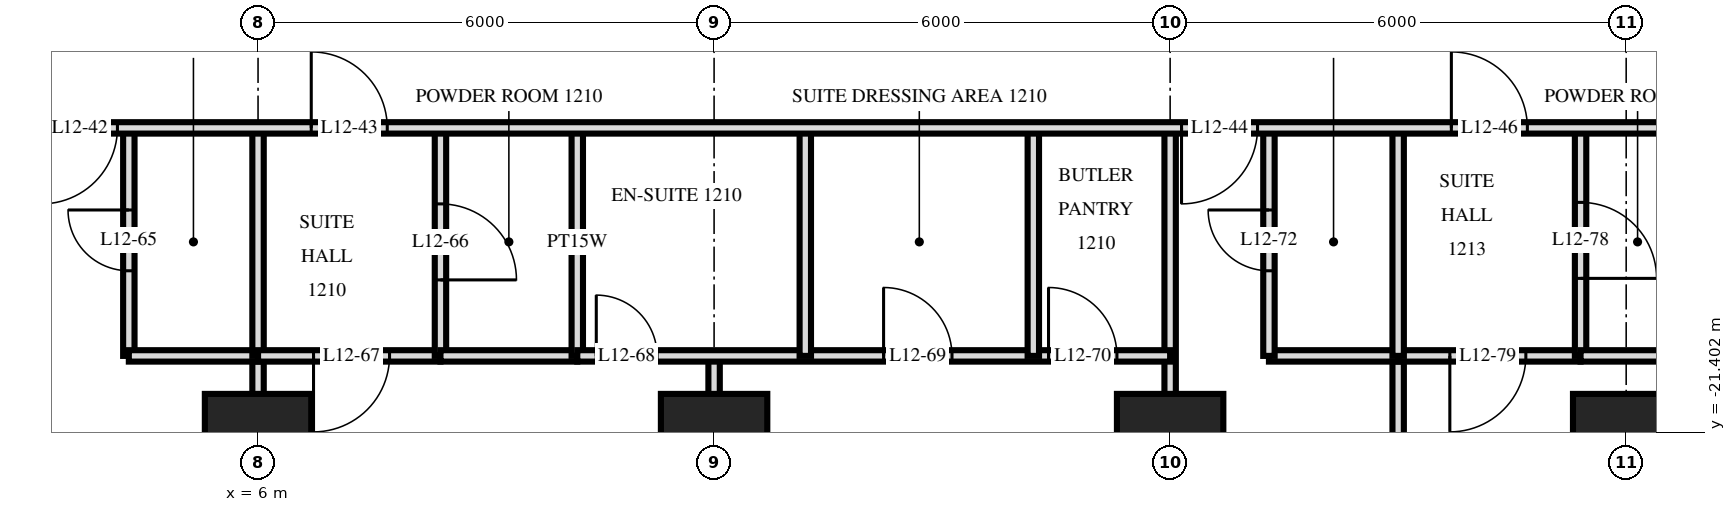
"""IFC4 building model, lengths in metres.
Left out: names, types, materials, properties, quantities, classifications, styles, units other than length and angle.
Written with IfcOpenShell. Run it as: python <this file> out.ifc"""

import sys

from ifc_helpers import new_model, si_unit, direction, frame, frame_2d, origin, origin_2d, place, context, subcontext, project, spatial, rectangle, extrude, element, fill, save


model = new_model("IFC4")
c1 = context("Model", 3, precision=1e-05, world=origin(), true_north=direction((0.0, 1.0)))
c2 = subcontext(c1, "Body", "Model", "MODEL_VIEW")
j1 = project(units=[si_unit("LENGTHUNIT", "METRE"), si_unit("PLANEANGLEUNIT", "RADIAN")], contexts=[c1])
p1 = place(None, origin())
s1 = spatial("IfcSite", under=j1, at=p1, CompositionType="ELEMENT")
p2 = place(p1, origin())
s2 = spatial("IfcBuilding", under=s1, at=p2, CompositionType="ELEMENT")
p3 = place(p2, frame((0.0, 0.0, 52.8)))
s3 = spatial("IfcBuildingStorey", under=s2, at=p3, CompositionType="ELEMENT", Elevation=52.8)
for number, where, z_axis, x_axis in (
    (1, (6.0, -21.6, 0.0), (0.0, 0.0, 1.0), (1.0, 0.0, 0.0)),
    (2, (12.0, -21.6, 0.0), (0.0, 0.0, 1.0), (1.0, 0.0, 0.0)),
    (3, (18.0, -21.6, 0.0), (0.0, 0.0, 1.0), (1.0, 0.0, 0.0)),
    (4, (24.0, -21.6, 0.0), (0.0, 0.0, 1.0), (1.0, 0.0, 0.0)),
):
    element("IfcColumn", number, at=place(p3, frame(where, z_axis=z_axis, x_axis=x_axis)), inside=s3, PredefinedType="COLUMN", context=c2, shape_type="SweptSolid", body=[
        extrude(rectangle(XDim=1.4, YDim=1.4, at=origin_2d()), origin(), (0.0, 0.0, 1.0), 3.6),
    ])
p4 = place(p3, frame((23.4, -20.4, 0.0), z_axis=(0.0, 0.0, 1.0), x_axis=(0.0, 1.0, 0.0)))
e5 = element("IfcWall", 5, at=p4, inside=s3, PredefinedType="PARTITIONING", context=c2, shape_type="SweptSolid", body=[
    extrude(rectangle(XDim=3.0, YDim=0.15, at=frame_2d((1.5, 0.0))), origin(), (0.0, 0.0, 1.0), 3.32),
])
p5 = place(p4, frame((1.02, 0.0, 0.0)))
e6 = element("IfcOpeningElement", 6, at=p5, cuts=e5, PredefinedType="OPENING", context=c2, shape_type="SweptSolid", body=[
    extrude(rectangle(XDim=1.0, YDim=2.1, at=frame_2d((0.5, 1.05))), frame((0.0, 0.085, 0.0), z_axis=(0.0, -1.0, 0.0), x_axis=(1.0, 0.0, 0.0)), (0.0, 0.0, 1.0), 0.17),
])
p6 = place(p3, frame((21.0, -20.4, 0.0), z_axis=(0.0, 0.0, 1.0), x_axis=(0.0, 1.0, 0.0)))
e7 = element("IfcWall", 7, at=p6, inside=s3, PredefinedType="PARTITIONING", context=c2, shape_type="SweptSolid", body=[
    extrude(rectangle(XDim=3.0, YDim=0.15, at=frame_2d((1.5, 0.0))), origin(), (0.0, 0.0, 1.0), 3.32),
])
p7 = place(p3, frame((21.0, -29.22, 0.0), z_axis=(0.0, 0.0, 1.0), x_axis=(0.0, 1.0, 0.0)))
e8 = element("IfcWall", 8, at=p7, inside=s3, PredefinedType="PARTITIONING", context=c2, shape_type="SweptSolid", body=[
    extrude(rectangle(XDim=8.82, YDim=0.15, at=frame_2d((4.41, 0.0))), origin(), (0.0, 0.0, 1.0), 3.32),
])
p8 = place(p3, frame((19.3, -20.4, 0.0), z_axis=(0.0, 0.0, 1.0), x_axis=(0.0, 1.0, 0.0)))
e9 = element("IfcWall", 9, at=p8, inside=s3, PredefinedType="PARTITIONING", context=c2, shape_type="SweptSolid", body=[
    extrude(rectangle(XDim=3.0, YDim=0.15, at=frame_2d((1.5, 0.0))), origin(), (0.0, 0.0, 1.0), 3.32),
])
p9 = place(p8, frame((1.12, 0.0, 0.0)))
e10 = element("IfcOpeningElement", 10, at=p9, cuts=e9, PredefinedType="OPENING", context=c2, shape_type="SweptSolid", body=[
    extrude(rectangle(XDim=0.8, YDim=2.1, at=frame_2d((0.4, 1.05))), frame((0.0, 0.085, 0.0), z_axis=(0.0, -1.0, 0.0), x_axis=(1.0, 0.0, 0.0)), (0.0, 0.0, 1.0), 0.17),
])
p10 = place(p3, frame((18.0, -29.22, 0.0), z_axis=(0.0, 0.0, 1.0), x_axis=(0.0, 1.0, 0.0)))
e11 = element("IfcWall", 11, at=p10, inside=s3, PredefinedType="PARTITIONING", context=c2, shape_type="SweptSolid", body=[
    extrude(rectangle(XDim=11.82, YDim=0.15, at=frame_2d((5.91, 0.0))), origin(), (0.0, 0.0, 1.0), 3.32),
])
for number, where, z_axis, x_axis in (
    (12, (16.2, -20.4, 0.0), (0.0, 0.0, 1.0), (0.0, 1.0, 0.0)),
    (13, (13.2, -20.4, 0.0), (0.0, 0.0, 1.0), (0.0, 1.0, 0.0)),
):
    element("IfcWall", number, at=place(p3, frame(where, z_axis=z_axis, x_axis=x_axis)), inside=s3, PredefinedType="PARTITIONING", context=c2, shape_type="SweptSolid", body=[
        extrude(rectangle(XDim=3.0, YDim=0.15, at=frame_2d((1.5, 0.0))), origin(), (0.0, 0.0, 1.0), 3.32),
    ])
p11 = place(p3, frame((12.0, -29.22, 0.0), z_axis=(0.0, 0.0, 1.0), x_axis=(0.0, 1.0, 0.0)))
e14 = element("IfcWall", 14, at=p11, inside=s3, PredefinedType="PARTITIONING", context=c2, shape_type="SweptSolid", body=[
    extrude(rectangle(XDim=8.82, YDim=0.15, at=frame_2d((4.41, 0.0))), origin(), (0.0, 0.0, 1.0), 3.32),
])
p12 = place(p11, frame((3.85, 0.0, 0.0)))
e15 = element("IfcOpeningElement", 15, at=p12, cuts=e14, PredefinedType="OPENING", context=c2, shape_type="SweptSolid", body=[
    extrude(rectangle(XDim=0.9, YDim=2.1, at=frame_2d((0.45, 1.05))), frame((0.0, 0.085, 0.0), z_axis=(0.0, -1.0, 0.0), x_axis=(1.0, 0.0, 0.0)), (0.0, 0.0, 1.0), 0.17),
])
p13 = place(p3, frame((10.2, -20.4, 0.0), z_axis=(0.0, 0.0, 1.0), x_axis=(0.0, 1.0, 0.0)))
e16 = element("IfcWall", 16, at=p13, inside=s3, PredefinedType="PLUMBINGWALL", context=c2, shape_type="SweptSolid", body=[
    extrude(rectangle(XDim=3.0, YDim=0.15, at=frame_2d((1.5, 0.0))), origin(), (0.0, 0.0, 1.0), 3.32),
])
p14 = place(p3, frame((8.4, -20.4, 0.0), z_axis=(0.0, 0.0, 1.0), x_axis=(0.0, 1.0, 0.0)))
e17 = element("IfcWall", 17, at=p14, inside=s3, PredefinedType="PARTITIONING", context=c2, shape_type="SweptSolid", body=[
    extrude(rectangle(XDim=3.0, YDim=0.15, at=frame_2d((1.5, 0.0))), origin(), (0.0, 0.0, 1.0), 3.32),
])
p15 = place(p14, frame((1.0, 0.0, 0.0)))
e18 = element("IfcOpeningElement", 18, at=p15, cuts=e17, PredefinedType="OPENING", context=c2, shape_type="SweptSolid", body=[
    extrude(rectangle(XDim=1.0, YDim=2.1, at=frame_2d((0.5, 1.05))), frame((0.0, 0.085, 0.0), z_axis=(0.0, -1.0, 0.0), x_axis=(1.0, 0.0, 0.0)), (0.0, 0.0, 1.0), 0.17),
])
p16 = place(p3, frame((6.0, -20.4, 0.0), z_axis=(0.0, 0.0, 1.0), x_axis=(0.0, 1.0, 0.0)))
e19 = element("IfcWall", 19, at=p16, inside=s3, PredefinedType="PARTITIONING", context=c2, shape_type="SweptSolid", body=[
    extrude(rectangle(XDim=3.0, YDim=0.15, at=frame_2d((1.5, 0.0))), origin(), (0.0, 0.0, 1.0), 3.32),
])
p17 = place(p3, frame((6.0, -29.22, 0.0), z_axis=(0.0, 0.0, 1.0), x_axis=(0.0, 1.0, 0.0)))
e20 = element("IfcWall", 20, at=p17, inside=s3, PredefinedType="PARTITIONING", context=c2, shape_type="SweptSolid", body=[
    extrude(rectangle(XDim=8.82, YDim=0.15, at=frame_2d((4.41, 0.0))), origin(), (0.0, 0.0, 1.0), 3.32),
])
p18 = place(p3, frame((4.3, -20.4, 0.0), z_axis=(0.0, 0.0, 1.0), x_axis=(0.0, 1.0, 0.0)))
e21 = element("IfcWall", 21, at=p18, inside=s3, PredefinedType="PARTITIONING", context=c2, shape_type="SweptSolid", body=[
    extrude(rectangle(XDim=3.0, YDim=0.15, at=frame_2d((1.5, 0.0))), origin(), (0.0, 0.0, 1.0), 3.32),
])
p19 = place(p18, frame((1.12, 0.0, 0.0)))
e22 = element("IfcOpeningElement", 22, at=p19, cuts=e21, PredefinedType="OPENING", context=c2, shape_type="SweptSolid", body=[
    extrude(rectangle(XDim=0.8, YDim=2.1, at=frame_2d((0.4, 1.05))), frame((0.0, 0.085, 0.0), z_axis=(0.0, -1.0, 0.0), x_axis=(1.0, 0.0, 0.0)), (0.0, 0.0, 1.0), 0.17),
])
p20 = place(p3, frame((6.0, -20.4, 0.0), z_axis=(0.0, 0.0, 1.0), x_axis=(1.0, 0.0, 0.0)))
e23 = element("IfcWall", 23, at=p20, inside=s3, PredefinedType="PARTITIONING", context=c2, shape_type="SweptSolid", body=[
    extrude(rectangle(XDim=2.4, YDim=0.15, at=frame_2d((1.2, 0.0))), origin(), (0.0, 0.0, 1.0), 3.32),
])
p21 = place(p20, frame((0.73, 0.0, 0.0)))
e24 = element("IfcOpeningElement", 24, at=p21, cuts=e23, PredefinedType="OPENING", context=c2, shape_type="SweptSolid", body=[
    extrude(rectangle(XDim=1.0, YDim=2.1, at=frame_2d((0.5, 1.05))), frame((0.0, 0.085, 0.0), z_axis=(0.0, -1.0, 0.0), x_axis=(1.0, 0.0, 0.0)), (0.0, 0.0, 1.0), 0.17),
])
p22 = place(p3, frame((21.0, -20.4, 0.0), z_axis=(0.0, 0.0, 1.0), x_axis=(1.0, 0.0, 0.0)))
e25 = element("IfcWall", 25, at=p22, inside=s3, PredefinedType="PARTITIONING", context=c2, shape_type="SweptSolid", body=[
    extrude(rectangle(XDim=2.4, YDim=0.15, at=frame_2d((1.2, 0.0))), origin(), (0.0, 0.0, 1.0), 3.32),
])
p23 = place(p22, frame((0.68, 0.0, 0.0)))
e26 = element("IfcOpeningElement", 26, at=p23, cuts=e25, PredefinedType="OPENING", context=c2, shape_type="SweptSolid", body=[
    extrude(rectangle(XDim=1.0, YDim=2.1, at=frame_2d((0.5, 1.05))), frame((0.0, 0.085, 0.0), z_axis=(0.0, -1.0, 0.0), x_axis=(1.0, 0.0, 0.0)), (0.0, 0.0, 1.0), 0.17),
])
p24 = place(p3, frame((4.3, -20.4, 0.0), z_axis=(0.0, 0.0, 1.0), x_axis=(1.0, 0.0, 0.0)))
e27 = element("IfcWall", 27, at=p24, inside=s3, PredefinedType="PARTITIONING", context=c2, shape_type="SweptSolid", body=[
    extrude(rectangle(XDim=1.7, YDim=0.15, at=frame_2d((0.85, 0.0))), origin(), (0.0, 0.0, 1.0), 3.32),
])
p25 = place(p3, frame((10.2, -20.4, 0.0), z_axis=(0.0, 0.0, 1.0), x_axis=(1.0, 0.0, 0.0)))
e28 = element("IfcWall", 28, at=p25, inside=s3, PredefinedType="PARTITIONING", context=c2, shape_type="SweptSolid", body=[
    extrude(rectangle(XDim=7.8, YDim=0.15, at=frame_2d((3.9, 0.0))), origin(), (0.0, 0.0, 1.0), 3.32),
])
p26 = place(p25, frame((0.25, 0.0, 0.0)))
e29 = element("IfcOpeningElement", 29, at=p26, cuts=e28, PredefinedType="OPENING", context=c2, shape_type="SweptSolid", body=[
    extrude(rectangle(XDim=0.8, YDim=2.1, at=frame_2d((0.4, 1.05))), frame((0.0, 0.085, 0.0), z_axis=(0.0, -1.0, 0.0), x_axis=(1.0, 0.0, 0.0)), (0.0, 0.0, 1.0), 0.17),
])
p27 = place(p25, frame((4.03, 0.0, 0.0)))
e30 = element("IfcOpeningElement", 30, at=p27, cuts=e28, PredefinedType="OPENING", context=c2, shape_type="SweptSolid", body=[
    extrude(rectangle(XDim=0.9, YDim=2.1, at=frame_2d((0.45, 1.05))), frame((0.0, 0.085, 0.0), z_axis=(0.0, -1.0, 0.0), x_axis=(1.0, 0.0, 0.0)), (0.0, 0.0, 1.0), 0.17),
])
p28 = place(p25, frame((6.2, 0.0, 0.0)))
e31 = element("IfcOpeningElement", 31, at=p28, cuts=e28, PredefinedType="OPENING", context=c2, shape_type="SweptSolid", body=[
    extrude(rectangle(XDim=0.9, YDim=2.1, at=frame_2d((0.45, 1.05))), frame((0.0, 0.085, 0.0), z_axis=(0.0, -1.0, 0.0), x_axis=(1.0, 0.0, 0.0)), (0.0, 0.0, 1.0), 0.17),
])
p29 = place(p3, frame((19.3, -20.4, 0.0), z_axis=(0.0, 0.0, 1.0), x_axis=(1.0, 0.0, 0.0)))
e32 = element("IfcWall", 32, at=p29, inside=s3, PredefinedType="PARTITIONING", context=c2, shape_type="SweptSolid", body=[
    extrude(rectangle(XDim=1.7, YDim=0.15, at=frame_2d((0.85, 0.0))), origin(), (0.0, 0.0, 1.0), 3.32),
])
p30 = place(p3, frame((8.4, -20.4, 0.0), z_axis=(0.0, 0.0, 1.0), x_axis=(1.0, 0.0, 0.0)))
e33 = element("IfcWall", 33, at=p30, inside=s3, PredefinedType="PLUMBINGWALL", context=c2, shape_type="SweptSolid", body=[
    extrude(rectangle(XDim=1.8, YDim=0.15, at=frame_2d((0.9, 0.0))), origin(), (0.0, 0.0, 1.0), 3.32),
])
p31 = place(p3, frame((23.4, -20.4, 0.0), z_axis=(0.0, 0.0, 1.0), x_axis=(1.0, 0.0, 0.0)))
e34 = element("IfcWall", 34, at=p31, inside=s3, PredefinedType="PLUMBINGWALL", context=c2, shape_type="SweptSolid", body=[
    extrude(rectangle(XDim=1.5, YDim=0.15, at=frame_2d((0.75, 0.0))), origin(), (0.0, 0.0, 1.0), 3.32),
])
p32 = place(p3, frame((-33.12, -17.4, 0.0), z_axis=(0.0, 0.0, 1.0), x_axis=(1.0, 0.0, 0.0)))
e35 = element("IfcWall", 35, at=p32, inside=s3, PredefinedType="PARTITIONING", context=c2, shape_type="SweptSolid", body=[
    extrude(rectangle(XDim=66.24, YDim=0.15, at=frame_2d((33.12, 0.0))), origin(), (0.0, 0.0, 1.0), 3.32),
])
p33 = place(p32, frame((9.27, 0.0, 0.0)))
e36 = element("IfcOpeningElement", 36, at=p33, cuts=e35, PredefinedType="OPENING", context=c2, shape_type="SweptSolid", body=[
    extrude(rectangle(XDim=1.0, YDim=2.1, at=frame_2d((0.5, 1.05))), frame((0.0, 0.085, 0.0), z_axis=(0.0, -1.0, 0.0), x_axis=(1.0, 0.0, 0.0)), (0.0, 0.0, 1.0), 0.17),
])
p34 = place(p32, frame((13.97, 0.0, 0.0)))
e37 = element("IfcOpeningElement", 37, at=p34, cuts=e35, PredefinedType="OPENING", context=c2, shape_type="SweptSolid", body=[
    extrude(rectangle(XDim=1.0, YDim=2.1, at=frame_2d((0.5, 1.05))), frame((0.0, 0.085, 0.0), z_axis=(0.0, -1.0, 0.0), x_axis=(1.0, 0.0, 0.0)), (0.0, 0.0, 1.0), 0.17),
])
p35 = place(p32, frame((15.27, 0.0, 0.0)))
e38 = element("IfcOpeningElement", 38, at=p35, cuts=e35, PredefinedType="OPENING", context=c2, shape_type="SweptSolid", body=[
    extrude(rectangle(XDim=1.0, YDim=2.1, at=frame_2d((0.5, 1.05))), frame((0.0, 0.085, 0.0), z_axis=(0.0, -1.0, 0.0), x_axis=(1.0, 0.0, 0.0)), (0.0, 0.0, 1.0), 0.17),
])
p36 = place(p32, frame((19.97, 0.0, 0.0)))
e39 = element("IfcOpeningElement", 39, at=p36, cuts=e35, PredefinedType="OPENING", context=c2, shape_type="SweptSolid", body=[
    extrude(rectangle(XDim=1.0, YDim=2.1, at=frame_2d((0.5, 1.05))), frame((0.0, 0.085, 0.0), z_axis=(0.0, -1.0, 0.0), x_axis=(1.0, 0.0, 0.0)), (0.0, 0.0, 1.0), 0.17),
])
p37 = place(p32, frame((22.27, 0.0, 0.0)))
e40 = element("IfcOpeningElement", 40, at=p37, cuts=e35, PredefinedType="OPENING", context=c2, shape_type="SweptSolid", body=[
    extrude(rectangle(XDim=1.0, YDim=2.1, at=frame_2d((0.5, 1.05))), frame((0.0, 0.085, 0.0), z_axis=(0.0, -1.0, 0.0), x_axis=(1.0, 0.0, 0.0)), (0.0, 0.0, 1.0), 0.17),
])
p38 = place(p32, frame((28.97, 0.0, 0.0)))
e41 = element("IfcOpeningElement", 41, at=p38, cuts=e35, PredefinedType="OPENING", context=c2, shape_type="SweptSolid", body=[
    extrude(rectangle(XDim=1.0, YDim=2.1, at=frame_2d((0.5, 1.05))), frame((0.0, 0.085, 0.0), z_axis=(0.0, -1.0, 0.0), x_axis=(1.0, 0.0, 0.0)), (0.0, 0.0, 1.0), 0.17),
])
p39 = place(p32, frame((30.27, 0.0, 0.0)))
e42 = element("IfcOpeningElement", 42, at=p39, cuts=e35, PredefinedType="OPENING", context=c2, shape_type="SweptSolid", body=[
    extrude(rectangle(XDim=1.0, YDim=2.1, at=frame_2d((0.5, 1.05))), frame((0.0, 0.085, 0.0), z_axis=(0.0, -1.0, 0.0), x_axis=(1.0, 0.0, 0.0)), (0.0, 0.0, 1.0), 0.17),
])
p40 = place(p32, frame((34.97, 0.0, 0.0)))
e43 = element("IfcOpeningElement", 43, at=p40, cuts=e35, PredefinedType="OPENING", context=c2, shape_type="SweptSolid", body=[
    extrude(rectangle(XDim=1.0, YDim=2.1, at=frame_2d((0.5, 1.05))), frame((0.0, 0.085, 0.0), z_axis=(0.0, -1.0, 0.0), x_axis=(1.0, 0.0, 0.0)), (0.0, 0.0, 1.0), 0.17),
])
p41 = place(p32, frame((36.27, 0.0, 0.0)))
e44 = element("IfcOpeningElement", 44, at=p41, cuts=e35, PredefinedType="OPENING", context=c2, shape_type="SweptSolid", body=[
    extrude(rectangle(XDim=1.0, YDim=2.1, at=frame_2d((0.5, 1.05))), frame((0.0, 0.085, 0.0), z_axis=(0.0, -1.0, 0.0), x_axis=(1.0, 0.0, 0.0)), (0.0, 0.0, 1.0), 0.17),
])
p42 = place(p32, frame((39.82, 0.0, 0.0)))
e45 = element("IfcOpeningElement", 45, at=p42, cuts=e35, PredefinedType="OPENING", context=c2, shape_type="SweptSolid", body=[
    extrude(rectangle(XDim=1.0, YDim=2.1, at=frame_2d((0.5, 1.05))), frame((0.0, 0.085, 0.0), z_axis=(0.0, -1.0, 0.0), x_axis=(1.0, 0.0, 0.0)), (0.0, 0.0, 1.0), 0.17),
])
p43 = place(p32, frame((51.27, 0.0, 0.0)))
e46 = element("IfcOpeningElement", 46, at=p43, cuts=e35, PredefinedType="OPENING", context=c2, shape_type="SweptSolid", body=[
    extrude(rectangle(XDim=1.0, YDim=2.1, at=frame_2d((0.5, 1.05))), frame((0.0, 0.085, 0.0), z_axis=(0.0, -1.0, 0.0), x_axis=(1.0, 0.0, 0.0)), (0.0, 0.0, 1.0), 0.17),
])
p44 = place(p32, frame((4.42, 0.0, 0.0)))
e47 = element("IfcOpeningElement", 47, at=p44, cuts=e35, PredefinedType="OPENING", context=c2, shape_type="SweptSolid", body=[
    extrude(rectangle(XDim=1.0, YDim=2.1, at=frame_2d((0.5, 1.05))), frame((0.0, 0.085, 0.0), z_axis=(0.0, -1.0, 0.0), x_axis=(1.0, 0.0, 0.0)), (0.0, 0.0, 1.0), 0.17),
])
p45 = place(p32, frame((54.82, 0.0, 0.0)))
e48 = element("IfcOpeningElement", 48, at=p45, cuts=e35, PredefinedType="OPENING", context=c2, shape_type="SweptSolid", body=[
    extrude(rectangle(XDim=1.0, YDim=2.1, at=frame_2d((0.5, 1.05))), frame((0.0, 0.085, 0.0), z_axis=(0.0, -1.0, 0.0), x_axis=(1.0, 0.0, 0.0)), (0.0, 0.0, 1.0), 0.17),
])
p46 = place(p41, frame((0.5, 0.0, 0.0), z_axis=(0.0, 0.0, 1.0), x_axis=(-1.0, 0.0, 0.0)))
e49 = element("IfcDoor", 49, at=p46, inside=s3, OperationType="SINGLE_SWING_LEFT", PredefinedType="DOOR", context=c2, shape_type="SweptSolid", body=[
    extrude(rectangle(XDim=1.0, YDim=2.1, at=frame_2d((0.0, 1.05))), frame((0.0, -0.025, 0.0), z_axis=(0.0, 1.0, 0.0), x_axis=(-1.0, 0.0, 0.0)), (0.0, 0.0, 1.0), 0.05),
])
fill(e44, e49)
p47 = place(p42, origin())
e50 = element("IfcDoor", 50, at=p47, inside=s3, OperationType="SINGLE_SWING_RIGHT", PredefinedType="DOOR", context=c2, shape_type="SweptSolid", body=[
    extrude(rectangle(XDim=1.0, YDim=2.1, at=frame_2d((0.5, 1.05))), frame((0.0, 0.025, 0.0), z_axis=(0.0, -1.0, 0.0), x_axis=(1.0, 0.0, 0.0)), (0.0, 0.0, 1.0), 0.05),
])
fill(e45, e50)
p48 = place(p43, frame((0.5, 0.0, 0.0), z_axis=(0.0, 0.0, 1.0), x_axis=(-1.0, 0.0, 0.0)))
e51 = element("IfcDoor", 51, at=p48, inside=s3, OperationType="SINGLE_SWING_LEFT", PredefinedType="DOOR", context=c2, shape_type="SweptSolid", body=[
    extrude(rectangle(XDim=1.0, YDim=2.1, at=frame_2d((0.0, 1.05))), frame((0.0, -0.025, 0.0), z_axis=(0.0, 1.0, 0.0), x_axis=(-1.0, 0.0, 0.0)), (0.0, 0.0, 1.0), 0.05),
])
fill(e46, e51)
p49 = place(p45, origin())
e52 = element("IfcDoor", 52, at=p49, inside=s3, OperationType="SINGLE_SWING_RIGHT", PredefinedType="DOOR", context=c2, shape_type="SweptSolid", body=[
    extrude(rectangle(XDim=1.0, YDim=2.1, at=frame_2d((0.5, 1.05))), frame((0.0, 0.025, 0.0), z_axis=(0.0, -1.0, 0.0), x_axis=(1.0, 0.0, 0.0)), (0.0, 0.0, 1.0), 0.05),
])
fill(e48, e52)
p50 = place(p19, origin())
e53 = element("IfcDoor", 53, at=p50, inside=s3, OperationType="SINGLE_SWING_LEFT", PredefinedType="DOOR", context=c2, shape_type="SweptSolid", body=[
    extrude(rectangle(XDim=0.8, YDim=2.1, at=frame_2d((0.4, 1.05))), frame((0.0, 0.025, 0.0), z_axis=(0.0, -1.0, 0.0), x_axis=(1.0, 0.0, 0.0)), (0.0, 0.0, 1.0), 0.05),
])
fill(e22, e53)
p51 = place(p15, frame((0.5, 0.0, 0.0), z_axis=(0.0, 0.0, 1.0), x_axis=(-1.0, 0.0, 0.0)))
e54 = element("IfcDoor", 54, at=p51, inside=s3, OperationType="SINGLE_SWING_LEFT", PredefinedType="DOOR", context=c2, shape_type="SweptSolid", body=[
    extrude(rectangle(XDim=1.0, YDim=2.1, at=frame_2d((0.0, 1.05))), frame((0.0, -0.025, 0.0), z_axis=(0.0, 1.0, 0.0), x_axis=(-1.0, 0.0, 0.0)), (0.0, 0.0, 1.0), 0.05),
])
fill(e18, e54)
p52 = place(p21, frame((0.5, 0.0, 0.0), z_axis=(0.0, 0.0, 1.0), x_axis=(-1.0, 0.0, 0.0)))
e55 = element("IfcDoor", 55, at=p52, inside=s3, OperationType="SINGLE_SWING_LEFT", PredefinedType="DOOR", context=c2, shape_type="SweptSolid", body=[
    extrude(rectangle(XDim=1.0, YDim=2.1, at=frame_2d((0.0, 1.05))), frame((0.0, -0.025, 0.0), z_axis=(0.0, 1.0, 0.0), x_axis=(-1.0, 0.0, 0.0)), (0.0, 0.0, 1.0), 0.05),
])
fill(e24, e55)
p53 = place(p26, origin())
e56 = element("IfcDoor", 56, at=p53, inside=s3, OperationType="SINGLE_SWING_RIGHT", PredefinedType="DOOR", context=c2, shape_type="SweptSolid", body=[
    extrude(rectangle(XDim=0.8, YDim=2.1, at=frame_2d((0.4, 1.05))), frame((0.0, 0.025, 0.0), z_axis=(0.0, -1.0, 0.0), x_axis=(1.0, 0.0, 0.0)), (0.0, 0.0, 1.0), 0.05),
])
fill(e29, e56)
p54 = place(p27, origin())
e57 = element("IfcDoor", 57, at=p54, inside=s3, OperationType="SINGLE_SWING_RIGHT", PredefinedType="DOOR", context=c2, shape_type="SweptSolid", body=[
    extrude(rectangle(XDim=0.9, YDim=2.1, at=frame_2d((0.45, 1.05))), frame((0.0, 0.025, 0.0), z_axis=(0.0, -1.0, 0.0), x_axis=(1.0, 0.0, 0.0)), (0.0, 0.0, 1.0), 0.05),
])
fill(e30, e57)
p55 = place(p28, origin())
e58 = element("IfcDoor", 58, at=p55, inside=s3, OperationType="SINGLE_SWING_RIGHT", PredefinedType="DOOR", context=c2, shape_type="SweptSolid", body=[
    extrude(rectangle(XDim=0.9, YDim=2.1, at=frame_2d((0.45, 1.05))), frame((0.0, 0.025, 0.0), z_axis=(0.0, -1.0, 0.0), x_axis=(1.0, 0.0, 0.0)), (0.0, 0.0, 1.0), 0.05),
])
fill(e31, e58)
p56 = place(p9, origin())
e59 = element("IfcDoor", 59, at=p56, inside=s3, OperationType="SINGLE_SWING_LEFT", PredefinedType="DOOR", context=c2, shape_type="SweptSolid", body=[
    extrude(rectangle(XDim=0.8, YDim=2.1, at=frame_2d((0.4, 1.05))), frame((0.0, 0.025, 0.0), z_axis=(0.0, -1.0, 0.0), x_axis=(1.0, 0.0, 0.0)), (0.0, 0.0, 1.0), 0.05),
])
fill(e10, e59)
p57 = place(p5, frame((0.5, 0.0, 0.0), z_axis=(0.0, 0.0, 1.0), x_axis=(-1.0, 0.0, 0.0)))
e60 = element("IfcDoor", 60, at=p57, inside=s3, OperationType="SINGLE_SWING_LEFT", PredefinedType="DOOR", context=c2, shape_type="SweptSolid", body=[
    extrude(rectangle(XDim=1.0, YDim=2.1, at=frame_2d((0.0, 1.05))), frame((0.0, -0.025, 0.0), z_axis=(0.0, 1.0, 0.0), x_axis=(-1.0, 0.0, 0.0)), (0.0, 0.0, 1.0), 0.05),
])
fill(e6, e60)
p58 = place(p23, frame((0.5, 0.0, 0.0), z_axis=(0.0, 0.0, 1.0), x_axis=(-1.0, 0.0, 0.0)))
e61 = element("IfcDoor", 61, at=p58, inside=s3, OperationType="SINGLE_SWING_LEFT", PredefinedType="DOOR", context=c2, shape_type="SweptSolid", body=[
    extrude(rectangle(XDim=1.0, YDim=2.1, at=frame_2d((0.0, 1.05))), frame((0.0, -0.025, 0.0), z_axis=(0.0, 1.0, 0.0), x_axis=(-1.0, 0.0, 0.0)), (0.0, 0.0, 1.0), 0.05),
])
fill(e26, e61)
save(model, sys.argv[1])
